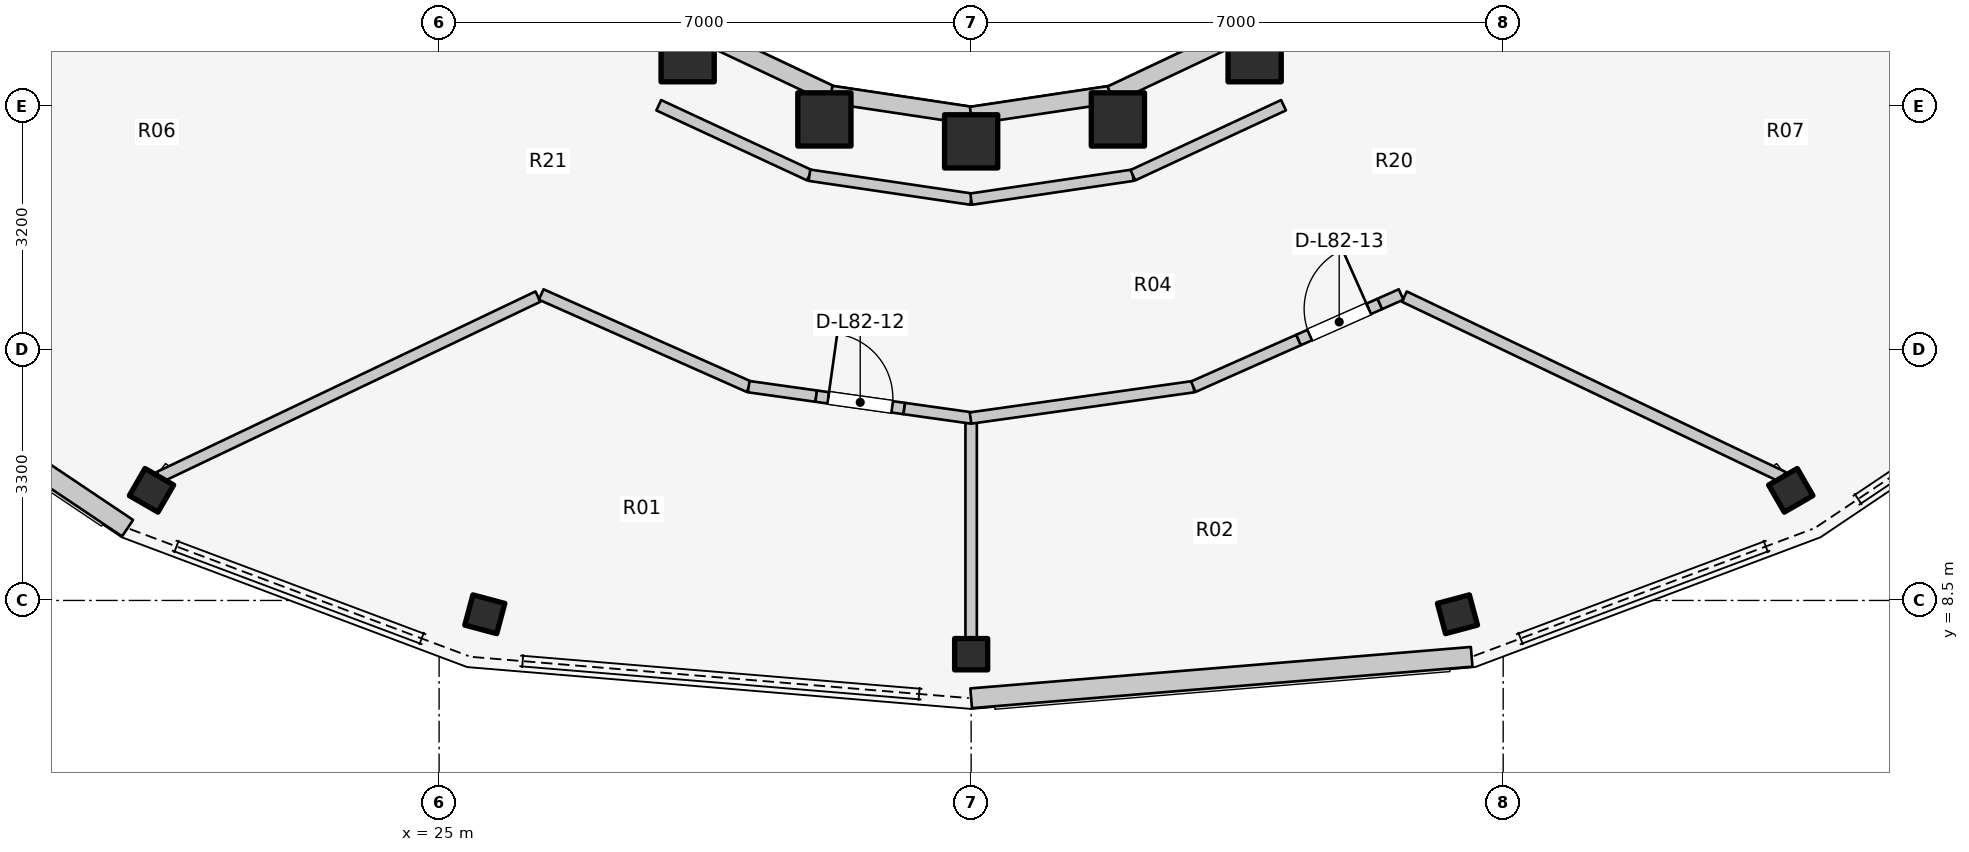
"""IFC4 building model, lengths in metres.
Left out: names, types, materials, properties, quantities, classifications, styles, units other than length and angle.
Written with IfcOpenShell. Run it as: python <this file> out.ifc"""

import sys

from ifc_helpers import new_model, si_unit, direction, frame, frame_2d, origin, origin_2d, place, context, subcontext, project, spatial, rectangle, i_section, extrude, element, fill, save


model = new_model("IFC4")
c1 = context("Model", 3, precision=1e-05, world=origin(), true_north=direction((0.0, 1.0)))
c2 = subcontext(c1, "Body", "Model", "MODEL_VIEW")
j1 = project(units=[si_unit("LENGTHUNIT", "METRE"), si_unit("PLANEANGLEUNIT", "RADIAN")], contexts=[c1])
p1 = place(None, origin())
s1 = spatial("IfcSite", under=j1, at=p1, CompositionType="ELEMENT")
p2 = place(p1, origin())
s2 = spatial("IfcBuilding", under=s1, at=p2, CompositionType="ELEMENT")
p3 = place(p2, frame((0.0, 0.0, 270.0)))
s3 = spatial("IfcBuildingStorey", under=s2, at=p3, CompositionType="ELEMENT", Elevation=270.0)
p4 = place(p3, frame((28.27, 15.673, 0.0), z_axis=(0.0, 0.0, 1.0), x_axis=(1.0, 0.0, 0.0)))
e1 = element("IfcColumn", 1, at=p4, inside=s3, PredefinedType="COLUMN", context=c2, shape_type="SweptSolid", body=[
    extrude(rectangle(XDim=0.7, YDim=0.7, at=origin_2d()), origin(), (0.0, 0.0, 1.0), 3.2),
])
p5 = place(p3, frame((21.216, 9.949, 0.0), z_axis=(0.0, 0.0, 1.0), x_axis=(-0.5, -0.866025403784, 0.0)))
e2 = element("IfcColumn", 2, at=p5, inside=s3, PredefinedType="COLUMN", context=c2, shape_type="SweptSolid", body=[
    extrude(i_section(OverallWidth=0.412, OverallDepth=0.435, WebThickness=0.036, FlangeThickness=0.057, FilletRadius=0.025, at=origin_2d()), origin(), (0.0, 0.0, 1.0), 3.2),
])
p6 = place(p3, frame((30.069, 14.828, 0.0), z_axis=(0.0, 0.0, 1.0), x_axis=(1.0, 0.0, 0.0)))
e3 = element("IfcColumn", 3, at=p6, inside=s3, PredefinedType="COLUMN", context=c2, shape_type="SweptSolid", body=[
    extrude(rectangle(XDim=0.7, YDim=0.7, at=origin_2d()), origin(), (0.0, 0.0, 1.0), 3.2),
])
p7 = place(p3, frame((25.601, 8.318, 0.0), z_axis=(0.0, 0.0, 1.0), x_axis=(-0.258819045103, -0.965925826289, 0.0)))
e4 = element("IfcColumn", 4, at=p7, inside=s3, PredefinedType="COLUMN", context=c2, shape_type="SweptSolid", body=[
    extrude(i_section(OverallWidth=0.412, OverallDepth=0.435, WebThickness=0.036, FlangeThickness=0.057, FilletRadius=0.025, at=origin_2d()), origin(), (0.0, 0.0, 1.0), 3.2),
])
p8 = place(p3, frame((32.0, 14.54, 0.0), z_axis=(0.0, 0.0, 1.0), x_axis=(1.0, 0.0, 0.0)))
e5 = element("IfcColumn", 5, at=p8, inside=s3, PredefinedType="COLUMN", context=c2, shape_type="SweptSolid", body=[
    extrude(rectangle(XDim=0.7, YDim=0.7, at=origin_2d()), origin(), (0.0, 0.0, 1.0), 3.2),
])
p9 = place(p3, frame((32.0, 7.793, 0.0), z_axis=(0.0, 0.0, 1.0), x_axis=(0.0, -1.0, 0.0)))
e6 = element("IfcColumn", 6, at=p9, inside=s3, PredefinedType="COLUMN", context=c2, shape_type="SweptSolid", body=[
    extrude(i_section(OverallWidth=0.412, OverallDepth=0.435, WebThickness=0.036, FlangeThickness=0.057, FilletRadius=0.025, at=origin_2d()), origin(), (0.0, 0.0, 1.0), 3.2),
])
p10 = place(p3, frame((33.931, 14.828, 0.0), z_axis=(0.0, 0.0, 1.0), x_axis=(1.0, 0.0, 0.0)))
e7 = element("IfcColumn", 7, at=p10, inside=s3, PredefinedType="COLUMN", context=c2, shape_type="SweptSolid", body=[
    extrude(rectangle(XDim=0.7, YDim=0.7, at=origin_2d()), origin(), (0.0, 0.0, 1.0), 3.2),
])
p11 = place(p3, frame((38.399, 8.318, 0.0), z_axis=(0.0, 0.0, 1.0), x_axis=(0.258819045103, -0.965925826289, 0.0)))
e8 = element("IfcColumn", 8, at=p11, inside=s3, PredefinedType="COLUMN", context=c2, shape_type="SweptSolid", body=[
    extrude(i_section(OverallWidth=0.412, OverallDepth=0.435, WebThickness=0.036, FlangeThickness=0.057, FilletRadius=0.025, at=origin_2d()), origin(), (0.0, 0.0, 1.0), 3.2),
])
p12 = place(p3, frame((35.73, 15.673, 0.0), z_axis=(0.0, 0.0, 1.0), x_axis=(1.0, 0.0, 0.0)))
e9 = element("IfcColumn", 9, at=p12, inside=s3, PredefinedType="COLUMN", context=c2, shape_type="SweptSolid", body=[
    extrude(rectangle(XDim=0.7, YDim=0.7, at=origin_2d()), origin(), (0.0, 0.0, 1.0), 3.2),
])
p13 = place(p3, frame((42.784, 9.949, 0.0), z_axis=(0.0, 0.0, 1.0), x_axis=(0.5, -0.866025403784, 0.0)))
e10 = element("IfcColumn", 10, at=p13, inside=s3, PredefinedType="COLUMN", context=c2, shape_type="SweptSolid", body=[
    extrude(i_section(OverallWidth=0.412, OverallDepth=0.435, WebThickness=0.036, FlangeThickness=0.057, FilletRadius=0.025, at=origin_2d()), origin(), (0.0, 0.0, 1.0), 3.2),
])
p14 = place(p3, frame((28.44, 15.968, 0.0), z_axis=(0.0, 0.0, 1.0), x_axis=(0.904179699603, -0.427152280606, 0.0)))
e11 = element("IfcWall", 11, at=p14, inside=s3, PredefinedType="STANDARD", context=c2, shape_type="SweptSolid", body=[
    extrude(rectangle(XDim=1.899, YDim=0.23, at=frame_2d((0.95, 0.0))), origin(), (0.0, 0.0, 1.0), 1.32),
])
for number, where, z_axis, x_axis in (
    (12, (30.157, 15.157, 0.0), (0.0, 0.0, 1.0), (0.989, -0.149, 0.0)),
    (13, (32.0, 14.88, 0.0), (0.0, 0.0, 1.0), (0.989, 0.149, 0.0)),
):
    element("IfcWall", number, at=place(p3, frame(where, z_axis=z_axis, x_axis=x_axis)), inside=s3, PredefinedType="STANDARD", context=c2, shape_type="SweptSolid", body=[
        extrude(rectangle(XDim=1.864, YDim=0.23, at=frame_2d((0.932, 0.0))), origin(), (0.0, 0.0, 1.0), 1.32),
    ])
p15 = place(p3, frame((33.843, 15.157, 0.0), z_axis=(0.0, 0.0, 1.0), x_axis=(0.904179699603, 0.427152280606, 0.0)))
e14 = element("IfcWall", 14, at=p15, inside=s3, PredefinedType="STANDARD", context=c2, shape_type="SweptSolid", body=[
    extrude(rectangle(XDim=1.899, YDim=0.23, at=frame_2d((0.95, 0.0))), origin(), (0.0, 0.0, 1.0), 1.32),
])
p16 = place(p3, frame((17.453, 11.764, 0.0), z_axis=(0.0, 0.0, 1.0), x_axis=(0.830427497225, -0.55712671077, 0.0)))
e15 = element("IfcWall", 15, at=p16, inside=s3, PredefinedType="STANDARD", context=c2, shape_type="SweptSolid", body=[
    extrude(rectangle(XDim=4.152, YDim=0.26, at=frame_2d((2.076, 0.0))), origin(), (0.0, 0.0, 1.0), 1.32),
])
p17 = place(p3, frame((32.0, 7.213, 0.0), z_axis=(0.0, 0.0, 1.0), x_axis=(0.996584886337, 0.082574598538, 0.0)))
e16 = element("IfcWall", 16, at=p17, inside=s3, PredefinedType="STANDARD", context=c2, shape_type="SweptSolid", body=[
    extrude(rectangle(XDim=6.608, YDim=0.26, at=frame_2d((3.304, 0.0))), origin(), (0.0, 0.0, 1.0), 1.32),
])
p18 = place(p3, frame((27.89, 15.015, 0.0), z_axis=(0.0, 0.0, 1.0), x_axis=(0.906943449489, -0.421252393975, 0.0)))
e17 = element("IfcWall", 17, at=p18, inside=s3, PredefinedType="PARTITIONING", context=c2, shape_type="SweptSolid", body=[
    extrude(rectangle(XDim=2.186, YDim=0.15, at=frame_2d((1.093, 0.0))), origin(), (0.0, 0.0, 1.0), 1.32),
])
for number, where, z_axis, x_axis in (
    (18, (29.873, 14.094, 0.0), (0.0, 0.0, 1.0), (0.989, -0.146, 0.0)),
    (19, (32.0, 13.78, 0.0), (0.0, 0.0, 1.0), (0.989, 0.146, 0.0)),
):
    element("IfcWall", number, at=place(p3, frame(where, z_axis=z_axis, x_axis=x_axis)), inside=s3, PredefinedType="PARTITIONING", context=c2, shape_type="SweptSolid", body=[
        extrude(rectangle(XDim=2.151, YDim=0.15, at=frame_2d((1.075, 0.0))), origin(), (0.0, 0.0, 1.0), 1.32),
    ])
p19 = place(p3, frame((34.127, 14.094, 0.0), z_axis=(0.0, 0.0, 1.0), x_axis=(0.906943449489, 0.421252393975, 0.0)))
e20 = element("IfcWall", 20, at=p19, inside=s3, PredefinedType="PARTITIONING", context=c2, shape_type="SweptSolid", body=[
    extrude(rectangle(XDim=2.186, YDim=0.15, at=frame_2d((1.093, 0.0))), origin(), (0.0, 0.0, 1.0), 1.32),
])
p20 = place(p3, frame((26.3, 12.497, 0.0), z_axis=(0.0, 0.0, 1.0), x_axis=(-0.902738701359, -0.430189303758, 0.0)))
e21 = element("IfcWall", 21, at=p20, inside=s3, PredefinedType="PARTITIONING", context=c2, shape_type="SweptSolid", body=[
    extrude(rectangle(XDim=5.521, YDim=0.15, at=frame_2d((2.761, 0.0))), origin(), (0.0, 0.0, 1.0), 1.32),
])
p21 = place(p3, frame((32.0, 10.845, 0.0), z_axis=(0.0, 0.0, 1.0), x_axis=(0.0, -1.0, 0.0)))
e22 = element("IfcWall", 22, at=p21, inside=s3, PredefinedType="PARTITIONING", context=c2, shape_type="SweptSolid", body=[
    extrude(rectangle(XDim=2.852, YDim=0.15, at=frame_2d((1.426, 0.0))), origin(), (0.0, 0.0, 1.0), 1.32),
])
p22 = place(p3, frame((37.7, 12.497, 0.0), z_axis=(0.0, 0.0, 1.0), x_axis=(0.902738701359, -0.430189303758, 0.0)))
e23 = element("IfcWall", 23, at=p22, inside=s3, PredefinedType="PARTITIONING", context=c2, shape_type="SweptSolid", body=[
    extrude(rectangle(XDim=5.521, YDim=0.15, at=frame_2d((2.761, 0.0))), origin(), (0.0, 0.0, 1.0), 1.32),
])
p23 = place(p3, frame((26.343, 12.525, 0.0), z_axis=(0.0, 0.0, 1.0), x_axis=(0.913989848226, -0.405737054432, 0.0)))
e24 = element("IfcWall", 24, at=p23, inside=s3, PredefinedType="PARTITIONING", context=c2, shape_type="SweptSolid", body=[
    extrude(rectangle(XDim=2.991, YDim=0.15, at=frame_2d((1.496, 0.0))), origin(), (0.0, 0.0, 1.0), 1.32),
])
p24 = place(p3, frame((29.073, 11.313, 0.0), z_axis=(0.0, 0.0, 1.0), x_axis=(0.990273584723, -0.13913384707, 0.0)))
e25 = element("IfcWall", 25, at=p24, inside=s3, PredefinedType="PARTITIONING", context=c2, shape_type="SweptSolid", body=[
    extrude(rectangle(XDim=0.897, YDim=0.15, at=frame_2d((0.448, 0.0))), origin(), (0.0, 0.0, 1.0), 2.445),
])
p25 = place(p3, frame((29.961, 11.188, 0.0), z_axis=(0.0, 0.0, 1.0), x_axis=(0.990239487993, -0.139376312259, 0.0)))
e26 = element("IfcWall", 26, at=p25, inside=s3, PredefinedType="PARTITIONING", context=c2, shape_type="SweptSolid", body=[
    extrude(rectangle(XDim=1.17, YDim=0.15, at=frame_2d((0.585, 0.0))), origin(), (0.0, 0.0, 1.0), 2.445),
])
p26 = place(p25, frame((0.16, 0.0, 0.0)))
e27 = element("IfcOpeningElement", 27, at=p26, cuts=e26, PredefinedType="OPENING", context=c2, shape_type="SweptSolid", body=[
    extrude(rectangle(XDim=0.85, YDim=2.05, at=frame_2d((0.425, 1.025))), frame((0.0, 0.085, 0.0), z_axis=(0.0, -1.0, 0.0), x_axis=(1.0, 0.0, 0.0)), (0.0, 0.0, 1.0), 0.17),
])
p27 = place(p3, frame((31.12, 11.025, 0.0), z_axis=(0.0, 0.0, 1.0), x_axis=(0.99023074259, -0.1394384324, 0.0)))
e28 = element("IfcWall", 28, at=p27, inside=s3, PredefinedType="PARTITIONING", context=c2, shape_type="SweptSolid", body=[
    extrude(rectangle(XDim=0.896, YDim=0.15, at=frame_2d((0.448, 0.0))), origin(), (0.0, 0.0, 1.0), 1.32),
])
p28 = place(p3, frame((31.992, 10.9, 0.0), z_axis=(0.0, 0.0, 1.0), x_axis=(0.990247167887, 0.139321737324, 0.0)))
e29 = element("IfcWall", 29, at=p28, inside=s3, PredefinedType="PARTITIONING", context=c2, shape_type="SweptSolid", body=[
    extrude(rectangle(XDim=2.963, YDim=0.15, at=frame_2d((1.481, 0.0))), origin(), (0.0, 0.0, 1.0), 1.32),
])
p29 = place(p3, frame((34.923, 11.312, 0.0), z_axis=(0.0, 0.0, 1.0), x_axis=(0.914037268574, 0.405630215416, 0.0)))
e30 = element("IfcWall", 30, at=p29, inside=s3, PredefinedType="PARTITIONING", context=c2, shape_type="SweptSolid", body=[
    extrude(rectangle(XDim=1.516, YDim=0.15, at=frame_2d((0.758, 0.0))), origin(), (0.0, 0.0, 1.0), 1.32),
])
p30 = place(p3, frame((36.308, 11.927, 0.0), z_axis=(0.0, 0.0, 1.0), x_axis=(0.913940571896, 0.405848039347, 0.0)))
e31 = element("IfcWall", 31, at=p30, inside=s3, PredefinedType="PARTITIONING", context=c2, shape_type="SweptSolid", body=[
    extrude(rectangle(XDim=1.17, YDim=0.15, at=frame_2d((0.585, 0.0))), origin(), (0.0, 0.0, 1.0), 2.11),
])
p31 = place(p30, frame((0.16, 0.0, 0.0)))
e32 = element("IfcOpeningElement", 32, at=p31, cuts=e31, PredefinedType="OPENING", context=c2, shape_type="SweptSolid", body=[
    extrude(rectangle(XDim=0.85, YDim=2.05, at=frame_2d((0.425, 1.025))), frame((0.0, 0.085, 0.0), z_axis=(0.0, -1.0, 0.0), x_axis=(1.0, 0.0, 0.0)), (0.0, 0.0, 1.0), 0.17),
])
p32 = place(p3, frame((37.377, 12.401, 0.0), z_axis=(0.0, 0.0, 1.0), x_axis=(0.91394327808, 0.405841945161, 0.0)))
e33 = element("IfcWall", 33, at=p32, inside=s3, PredefinedType="PARTITIONING", context=c2, shape_type="SweptSolid", body=[
    extrude(rectangle(XDim=0.306, YDim=0.15, at=frame_2d((0.153, 0.0))), origin(), (0.0, 0.0, 1.0), 2.915),
])
p33 = place(p26, origin())
e34 = element("IfcDoor", 34, at=p33, inside=s3, OperationType="SINGLE_SWING_LEFT", PredefinedType="DOOR", context=c2, shape_type="SweptSolid", body=[
    extrude(rectangle(XDim=0.85, YDim=2.05, at=frame_2d((0.425, 1.025))), frame((0.0, 0.025, 0.0), z_axis=(0.0, -1.0, 0.0), x_axis=(1.0, 0.0, 0.0)), (0.0, 0.0, 1.0), 0.05),
])
fill(e27, e34)
p34 = place(p31, origin())
e35 = element("IfcDoor", 35, at=p34, inside=s3, OperationType="SINGLE_SWING_RIGHT", PredefinedType="DOOR", context=c2, shape_type="SweptSolid", body=[
    extrude(rectangle(XDim=0.85, YDim=2.05, at=frame_2d((0.425, 1.025))), frame((0.0, 0.025, 0.0), z_axis=(0.0, -1.0, 0.0), x_axis=(1.0, 0.0, 0.0)), (0.0, 0.0, 1.0), 0.05),
])
fill(e32, e35)
save(model, sys.argv[1])
